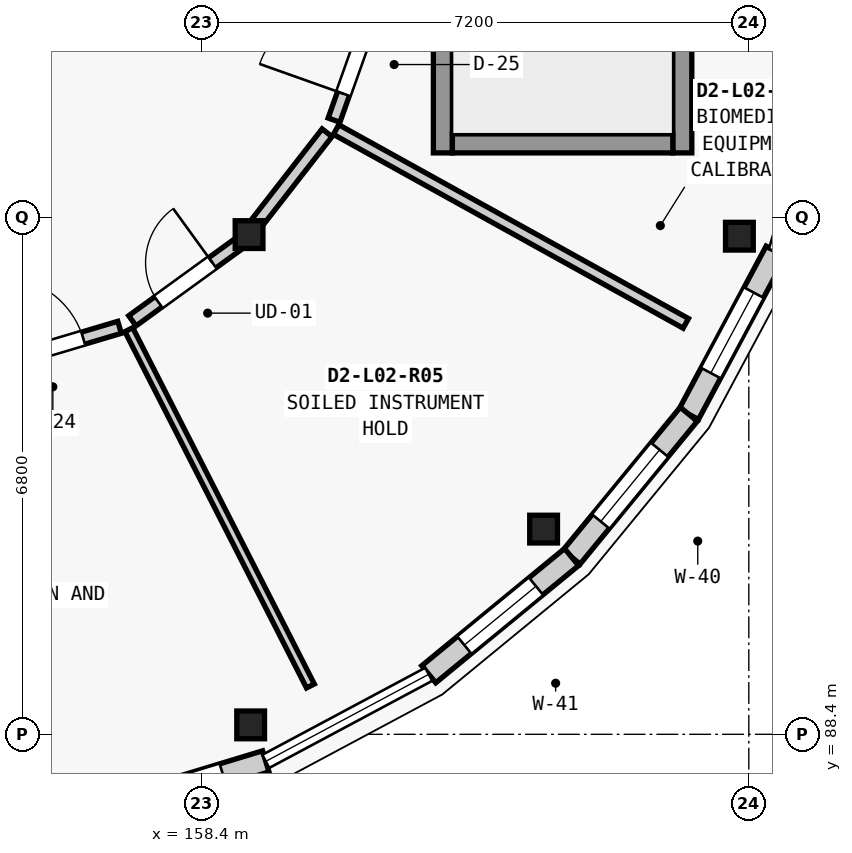
"""IFC4 building model, lengths in metres.
Left out: names, types, materials, properties, quantities, classifications, styles, units other than length and angle.
Written with IfcOpenShell. Run it as: python <this file> out.ifc"""

import sys

from ifc_helpers import new_model, si_unit, direction, frame, frame_2d, origin, origin_2d, place, context, subcontext, project, spatial, rectangle, extrude, element, fill, save


model = new_model("IFC4")
c1 = context("Model", 3, precision=1e-05, world=origin(), true_north=direction((0.0, 1.0)))
c2 = subcontext(c1, "Body", "Model", "MODEL_VIEW")
j1 = project(units=[si_unit("LENGTHUNIT", "METRE"), si_unit("PLANEANGLEUNIT", "RADIAN")], contexts=[c1])
p1 = place(None, origin())
s1 = spatial("IfcSite", under=j1, at=p1, CompositionType="ELEMENT")
p2 = place(p1, origin())
s2 = spatial("IfcBuilding", under=s1, at=p2, CompositionType="ELEMENT")
p3 = place(p2, frame((0.0, 0.0, 8.75)))
s3 = spatial("IfcBuildingStorey", under=s2, at=p3, CompositionType="ELEMENT", Elevation=8.75)
for number, where, z_axis, x_axis in (
    (1, (159.046, 88.524, 0.0), (0.0, 0.0, 1.0), (1.0, 0.0, 0.0)),
    (2, (162.9, 91.1, 0.0), (0.0, 0.0, 1.0), (1.0, 0.0, 0.0)),
    (3, (165.476, 94.954, 0.0), (0.0, 0.0, 1.0), (1.0, 0.0, 0.0)),
    (4, (159.025, 94.975, 0.0), (0.0, 0.0, 1.0), (1.0, 0.0, 0.0)),
):
    element("IfcColumn", number, at=place(p3, frame(where, z_axis=z_axis, x_axis=x_axis)), inside=s3, PredefinedType="COLUMN", context=c2, shape_type="SweptSolid", body=[
        extrude(rectangle(XDim=0.365, YDim=0.365, at=origin_2d()), origin(), (0.0, 0.0, 1.0), 4.2),
    ])
p4 = place(p3, frame((165.956, 94.755, 0.0), z_axis=(0.0, 0.0, 1.0), x_axis=(-0.471432490996, -0.881902152415, 0.0)))
e5 = element("IfcWall", 5, at=p4, inside=s3, PredefinedType="ELEMENTEDWALL", context=c2, shape_type="SweptSolid", body=[
    extrude(rectangle(XDim=2.431, YDim=0.29, at=frame_2d((1.215, 0.0))), origin(), (0.0, 0.0, 1.0), 3.329),
])
p5 = place(p4, frame((0.616, 0.0, 0.85)))
e6 = element("IfcOpeningElement", 6, at=p5, cuts=e5, PredefinedType="OPENING", context=c2, shape_type="SweptSolid", body=[
    extrude(rectangle(XDim=1.2, YDim=2.25, at=frame_2d((0.6, 1.125))), frame((0.0, 0.155, 0.0), z_axis=(0.0, -1.0, 0.0), x_axis=(1.0, 0.0, 0.0)), (0.0, 0.0, 1.0), 0.31),
])
p6 = place(p3, frame((164.81, 92.611, 0.0), z_axis=(0.0, 0.0, 1.0), x_axis=(-0.634347392822, -0.773048113134, 0.0)))
e7 = element("IfcWall", 7, at=p6, inside=s3, PredefinedType="ELEMENTEDWALL", context=c2, shape_type="SweptSolid", body=[
    extrude(rectangle(XDim=2.431, YDim=0.29, at=frame_2d((1.215, 0.0))), origin(), (0.0, 0.0, 1.0), 3.329),
])
p7 = place(p6, frame((0.605, 0.0, 0.85)))
e8 = element("IfcOpeningElement", 8, at=p7, cuts=e7, PredefinedType="OPENING", context=c2, shape_type="SweptSolid", body=[
    extrude(rectangle(XDim=1.22, YDim=1.5, at=frame_2d((0.61, 0.75))), frame((0.0, 0.155, 0.0), z_axis=(0.0, -1.0, 0.0), x_axis=(1.0, 0.0, 0.0)), (0.0, 0.0, 1.0), 0.31),
])
p8 = place(p3, frame((163.268, 90.732, 0.0), z_axis=(0.0, 0.0, 1.0), x_axis=(-0.773048113134, -0.634347392822, 0.0)))
e9 = element("IfcWall", 9, at=p8, inside=s3, PredefinedType="ELEMENTEDWALL", context=c2, shape_type="SweptSolid", body=[
    extrude(rectangle(XDim=2.431, YDim=0.29, at=frame_2d((1.215, 0.0))), origin(), (0.0, 0.0, 1.0), 3.329),
])
p9 = place(p8, frame((0.605, 0.0, 0.85)))
e10 = element("IfcOpeningElement", 10, at=p9, cuts=e9, PredefinedType="OPENING", context=c2, shape_type="SweptSolid", body=[
    extrude(rectangle(XDim=1.22, YDim=1.8, at=frame_2d((0.61, 0.9))), frame((0.0, 0.155, 0.0), z_axis=(0.0, -1.0, 0.0), x_axis=(1.0, 0.0, 0.0)), (0.0, 0.0, 1.0), 0.31),
])
p10 = place(p3, frame((159.245, 88.044, 0.0), z_axis=(0.0, 0.0, 1.0), x_axis=(-0.956892539407, -0.290442193951, 0.0)))
e11 = element("IfcWall", 11, at=p10, inside=s3, PredefinedType="ELEMENTEDWALL", context=c2, shape_type="SweptSolid", body=[
    extrude(rectangle(XDim=2.431, YDim=0.29, at=frame_2d((1.215, 0.0))), origin(), (0.0, 0.0, 1.0), 3.329),
])
p11 = place(p10, frame((0.59, 0.0, 0.85)))
e12 = element("IfcOpeningElement", 12, at=p11, cuts=e11, PredefinedType="OPENING", context=c2, shape_type="SweptSolid", body=[
    extrude(rectangle(XDim=1.25, YDim=1.5, at=frame_2d((0.625, 0.75))), frame((0.0, 0.155, 0.0), z_axis=(0.0, -1.0, 0.0), x_axis=(1.0, 0.0, 0.0)), (0.0, 0.0, 1.0), 0.31),
])
p12 = place(p3, frame((161.575, 102.95, 0.0), z_axis=(0.0, 0.0, 1.0), x_axis=(0.0, -1.0, 0.0)))
e13 = element("IfcWall", 13, at=p12, inside=s3, PredefinedType="SHEAR", context=c2, shape_type="SweptSolid", body=[
    extrude(rectangle(XDim=6.9, YDim=0.25, at=frame_2d((3.45, 0.0))), origin(), (0.0, 0.0, 1.0), 3.975),
])
p13 = place(p12, frame((0.43, 0.0, 0.0)))
e14 = element("IfcOpeningElement", 14, at=p13, cuts=e13, PredefinedType="OPENING", context=c2, shape_type="SweptSolid", body=[
    extrude(rectangle(XDim=1.1, YDim=2.15, at=frame_2d((0.55, 1.075))), frame((0.0, 0.135, 0.0), z_axis=(0.0, -1.0, 0.0), x_axis=(1.0, 0.0, 0.0)), (0.0, 0.0, 1.0), 0.27),
])
p14 = place(p3, frame((164.725, 102.95, 0.0), z_axis=(0.0, 0.0, 1.0), x_axis=(0.0, -1.0, 0.0)))
e15 = element("IfcWall", 15, at=p14, inside=s3, PredefinedType="SHEAR", context=c2, shape_type="SweptSolid", body=[
    extrude(rectangle(XDim=6.9, YDim=0.25, at=frame_2d((3.45, 0.0))), origin(), (0.0, 0.0, 1.0), 3.975),
])
p15 = place(p3, frame((161.7, 96.175, 0.0), z_axis=(0.0, 0.0, 1.0), x_axis=(1.0, 0.0, 0.0)))
e16 = element("IfcWall", 16, at=p15, inside=s3, PredefinedType="SHEAR", context=c2, shape_type="SweptSolid", body=[
    extrude(rectangle(XDim=2.9, YDim=0.25, at=frame_2d((1.45, 0.0))), origin(), (0.0, 0.0, 1.0), 3.975),
])
p16 = place(p3, frame((157.443, 93.724, 0.0), z_axis=(0.0, 0.0, 1.0), x_axis=(0.454011967175, -0.890995585658, 0.0)))
e17 = element("IfcWall", 17, at=p16, inside=s3, PredefinedType="PARTITIONING", context=c2, shape_type="SweptSolid", body=[
    extrude(rectangle(XDim=5.262, YDim=0.115, at=frame_2d((2.631, 0.0))), origin(), (0.0, 0.0, 1.0), 3.304),
])
p17 = place(p3, frame((160.17, 96.357, 0.0), z_axis=(0.0, 0.0, 1.0), x_axis=(0.874649389138, -0.484756068638, 0.0)))
e18 = element("IfcWall", 18, at=p17, inside=s3, PredefinedType="PARTITIONING", context=c2, shape_type="SweptSolid", body=[
    extrude(rectangle(XDim=5.26, YDim=0.145, at=frame_2d((2.63, 0.0))), origin(), (0.0, 0.0, 1.0), 3.304),
])
p18 = place(p3, frame((155.28, 93.148, 0.0), z_axis=(0.0, 0.0, 1.0), x_axis=(0.958517732376, 0.285032904628, 0.0)))
e19 = element("IfcWall", 19, at=p18, inside=s3, PredefinedType="PARTITIONING", context=c2, shape_type="SweptSolid", body=[
    extrude(rectangle(XDim=2.129, YDim=0.165, at=frame_2d((1.065, 0.0))), origin(), (0.0, 0.0, 1.0), 3.304),
])
p19 = place(p18, frame((0.5, 0.0, 0.0)))
e20 = element("IfcOpeningElement", 20, at=p19, cuts=e19, PredefinedType="OPENING", context=c2, shape_type="SweptSolid", body=[
    extrude(rectangle(XDim=1.13, YDim=2.14, at=frame_2d((0.565, 1.07))), frame((0.0, 0.093, 0.0), z_axis=(0.0, -1.0, 0.0), x_axis=(1.0, 0.0, 0.0)), (0.0, 0.0, 1.0), 0.185),
])
p20 = place(p3, frame((157.49, 93.841, 0.0), z_axis=(0.0, 0.0, 1.0), x_axis=(0.809526218979, 0.587083725533, 0.0)))
e21 = element("IfcWall", 21, at=p20, inside=s3, PredefinedType="PARTITIONING", context=c2, shape_type="SweptSolid", body=[
    extrude(rectangle(XDim=1.722, YDim=0.165, at=frame_2d((0.861, 0.0))), origin(), (0.0, 0.0, 1.0), 3.304),
])
p21 = place(p20, frame((0.421, 0.0, 0.0)))
e22 = element("IfcOpeningElement", 22, at=p21, cuts=e21, PredefinedType="OPENING", context=c2, shape_type="SweptSolid", body=[
    extrude(rectangle(XDim=0.88, YDim=2.1, at=frame_2d((0.44, 1.05))), frame((0.0, 0.093, 0.0), z_axis=(0.0, -1.0, 0.0), x_axis=(1.0, 0.0, 0.0)), (0.0, 0.0, 1.0), 0.185),
])
p22 = place(p3, frame((159.129, 95.131, 0.0), z_axis=(0.0, 0.0, 1.0), x_axis=(0.61450363649, 0.788913988176, 0.0)))
e23 = element("IfcWall", 23, at=p22, inside=s3, PredefinedType="PARTITIONING", context=c2, shape_type="SweptSolid", body=[
    extrude(rectangle(XDim=1.5, YDim=0.165, at=frame_2d((0.75, 0.0))), origin(), (0.0, 0.0, 1.0), 3.304),
])
p23 = place(p3, frame((160.143, 96.481, 0.0), z_axis=(0.0, 0.0, 1.0), x_axis=(0.334820358273, 0.942281978861, 0.0)))
e24 = element("IfcWall", 24, at=p23, inside=s3, PredefinedType="PARTITIONING", context=c2, shape_type="SweptSolid", body=[
    extrude(rectangle(XDim=1.908, YDim=0.165, at=frame_2d((0.954, 0.0))), origin(), (0.0, 0.0, 1.0), 3.304),
])
p24 = place(p23, frame((0.369, 0.0, 0.0)))
e25 = element("IfcOpeningElement", 25, at=p24, cuts=e24, PredefinedType="OPENING", context=c2, shape_type="SweptSolid", body=[
    extrude(rectangle(XDim=1.17, YDim=2.24, at=frame_2d((0.585, 1.12))), frame((0.0, 0.093, 0.0), z_axis=(0.0, -1.0, 0.0), x_axis=(1.0, 0.0, 0.0)), (0.0, 0.0, 1.0), 0.185),
])
p25 = place(p5, origin())
e26 = element("IfcWindow", 26, at=p25, inside=s3, PartitioningType="SINGLE_PANEL", PredefinedType="WINDOW", context=c2, shape_type="SweptSolid", body=[
    extrude(rectangle(XDim=1.2, YDim=2.25, at=frame_2d((0.6, 1.125))), frame((0.0, 0.03, 0.0), z_axis=(0.0, -1.0, 0.0), x_axis=(1.0, 0.0, 0.0)), (0.0, 0.0, 1.0), 0.06),
])
fill(e6, e26)
p26 = place(p7, origin())
e27 = element("IfcWindow", 27, at=p26, inside=s3, PartitioningType="SINGLE_PANEL", PredefinedType="WINDOW", context=c2, shape_type="SweptSolid", body=[
    extrude(rectangle(XDim=1.22, YDim=1.5, at=frame_2d((0.61, 0.75))), frame((0.0, 0.03, 0.0), z_axis=(0.0, -1.0, 0.0), x_axis=(1.0, 0.0, 0.0)), (0.0, 0.0, 1.0), 0.06),
])
fill(e8, e27)
p27 = place(p9, origin())
e28 = element("IfcWindow", 28, at=p27, inside=s3, PartitioningType="SINGLE_PANEL", PredefinedType="WINDOW", context=c2, shape_type="SweptSolid", body=[
    extrude(rectangle(XDim=1.22, YDim=1.8, at=frame_2d((0.61, 0.9))), frame((0.0, 0.03, 0.0), z_axis=(0.0, -1.0, 0.0), x_axis=(1.0, 0.0, 0.0)), (0.0, 0.0, 1.0), 0.06),
])
fill(e10, e28)
p28 = place(p11, origin())
e29 = element("IfcWindow", 29, at=p28, inside=s3, PartitioningType="SINGLE_PANEL", PredefinedType="WINDOW", context=c2, shape_type="SweptSolid", body=[
    extrude(rectangle(XDim=1.25, YDim=1.5, at=frame_2d((0.625, 0.75))), frame((0.0, 0.03, 0.0), z_axis=(0.0, -1.0, 0.0), x_axis=(1.0, 0.0, 0.0)), (0.0, 0.0, 1.0), 0.06),
])
fill(e12, e29)
p29 = place(p19, origin())
e30 = element("IfcDoor", 30, at=p29, inside=s3, OperationType="SINGLE_SWING_LEFT", PredefinedType="DOOR", context=c2, shape_type="SweptSolid", body=[
    extrude(rectangle(XDim=1.13, YDim=2.14, at=frame_2d((0.565, 1.07))), frame((0.0, 0.025, 0.0), z_axis=(0.0, -1.0, 0.0), x_axis=(1.0, 0.0, 0.0)), (0.0, 0.0, 1.0), 0.05),
])
fill(e20, e30)
p30 = place(p21, origin())
e31 = element("IfcDoor", 31, at=p30, inside=s3, OperationType="SINGLE_SWING_RIGHT", PredefinedType="DOOR", context=c2, shape_type="SweptSolid", body=[
    extrude(rectangle(XDim=0.88, YDim=2.1, at=frame_2d((0.44, 1.05))), frame((0.0, 0.025, 0.0), z_axis=(0.0, -1.0, 0.0), x_axis=(1.0, 0.0, 0.0)), (0.0, 0.0, 1.0), 0.05),
])
fill(e22, e31)
p31 = place(p24, origin())
e32 = element("IfcDoor", 32, at=p31, inside=s3, OperationType="SINGLE_SWING_LEFT", PredefinedType="DOOR", context=c2, shape_type="SweptSolid", body=[
    extrude(rectangle(XDim=1.17, YDim=2.24, at=frame_2d((0.585, 1.12))), frame((0.0, 0.025, 0.0), z_axis=(0.0, -1.0, 0.0), x_axis=(1.0, 0.0, 0.0)), (0.0, 0.0, 1.0), 0.05),
])
fill(e25, e32)
save(model, sys.argv[1])
